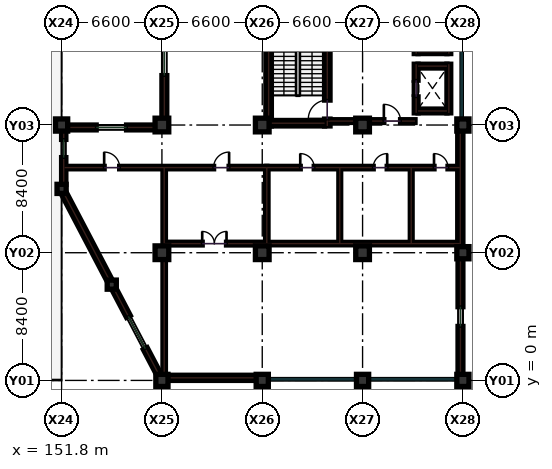
"""IFC4 building model, lengths in metres.
Left out: names, types, materials, properties, quantities, classifications, styles, units other than length and angle.
Written with IfcOpenShell. Run it as: python <this file> out.ifc"""

import sys

from ifc_helpers import new_model, si_unit, direction, frame, frame_2d, origin, origin_2d, place, context, subcontext, project, spatial, rectangle, extrude, element, fill, save


model = new_model("IFC4")
c1 = context("Model", 3, precision=1e-05, world=origin(), true_north=direction((0.0, 1.0)))
c2 = subcontext(c1, "Body", "Model", "MODEL_VIEW")
j1 = project(units=[si_unit("LENGTHUNIT", "METRE"), si_unit("PLANEANGLEUNIT", "RADIAN")], contexts=[c1])
p1 = place(None, origin())
s1 = spatial("IfcSite", under=j1, at=p1, CompositionType="ELEMENT")
p2 = place(p1, origin())
s2 = spatial("IfcBuilding", under=s1, at=p2, CompositionType="ELEMENT")
p3 = place(p2, frame((0.0, 0.0, 5.4)))
s3 = spatial("IfcBuildingStorey", under=s2, at=p3, CompositionType="ELEMENT", Elevation=5.4)
for number, where, z_axis, x_axis in (
    (1, (151.8, 16.8, 0.0), (0.0, 0.0, 1.0), (1.0, 0.0, 0.0)),
    (2, (158.4, 0.0, 0.0), (0.0, 0.0, 1.0), (1.0, 0.0, 0.0)),
):
    element("IfcColumn", number, at=place(p3, frame(where, z_axis=z_axis, x_axis=x_axis)), inside=s3, PredefinedType="COLUMN", context=c2, shape_type="SweptSolid", body=[
        extrude(rectangle(XDim=0.8, YDim=0.8, at=origin_2d()), origin(), (0.0, 0.0, 1.0), 4.5),
    ])
for number, where, z_axis, x_axis in (
    (3, (158.4, 8.4, 0.0), (0.0, 0.0, 1.0), (1.0, 0.0, 0.0)),
    (4, (158.4, 16.8, 0.0), (0.0, 0.0, 1.0), (1.0, 0.0, 0.0)),
):
    element("IfcColumn", number, at=place(p3, frame(where, z_axis=z_axis, x_axis=x_axis)), inside=s3, PredefinedType="COLUMN", context=c2, shape_type="SweptSolid", body=[
        extrude(rectangle(XDim=0.9, YDim=0.9, at=origin_2d()), origin(), (0.0, 0.0, 1.0), 4.5),
    ])
p4 = place(p3, frame((165.0, 0.0, 0.0), z_axis=(0.0, 0.0, 1.0), x_axis=(1.0, 0.0, 0.0)))
e5 = element("IfcColumn", 5, at=p4, inside=s3, PredefinedType="COLUMN", context=c2, shape_type="SweptSolid", body=[
    extrude(rectangle(XDim=0.8, YDim=0.8, at=origin_2d()), origin(), (0.0, 0.0, 1.0), 4.5),
])
for number, where, z_axis, x_axis in (
    (6, (165.0, 8.4, 0.0), (0.0, 0.0, 1.0), (1.0, 0.0, 0.0)),
    (7, (165.0, 16.8, 0.0), (0.0, 0.0, 1.0), (1.0, 0.0, 0.0)),
):
    element("IfcColumn", number, at=place(p3, frame(where, z_axis=z_axis, x_axis=x_axis)), inside=s3, PredefinedType="COLUMN", context=c2, shape_type="SweptSolid", body=[
        extrude(rectangle(XDim=0.9, YDim=0.9, at=origin_2d()), origin(), (0.0, 0.0, 1.0), 4.5),
    ])
p5 = place(p3, frame((171.6, 0.0, 0.0), z_axis=(0.0, 0.0, 1.0), x_axis=(1.0, 0.0, 0.0)))
e8 = element("IfcColumn", 8, at=p5, inside=s3, PredefinedType="COLUMN", context=c2, shape_type="SweptSolid", body=[
    extrude(rectangle(XDim=0.8, YDim=0.8, at=origin_2d()), origin(), (0.0, 0.0, 1.0), 4.5),
])
for number, where, z_axis, x_axis in (
    (9, (171.6, 8.4, 0.0), (0.0, 0.0, 1.0), (1.0, 0.0, 0.0)),
    (10, (171.6, 16.8, 0.0), (0.0, 0.0, 1.0), (1.0, 0.0, 0.0)),
):
    element("IfcColumn", number, at=place(p3, frame(where, z_axis=z_axis, x_axis=x_axis)), inside=s3, PredefinedType="COLUMN", context=c2, shape_type="SweptSolid", body=[
        extrude(rectangle(XDim=0.9, YDim=0.9, at=origin_2d()), origin(), (0.0, 0.0, 1.0), 4.5),
    ])
for number, where, z_axis, x_axis in (
    (11, (178.2, 0.0, 0.0), (0.0, 0.0, 1.0), (1.0, 0.0, 0.0)),
    (12, (178.2, 8.4, 0.0), (0.0, 0.0, 1.0), (1.0, 0.0, 0.0)),
    (13, (178.2, 16.8, 0.0), (0.0, 0.0, 1.0), (1.0, 0.0, 0.0)),
):
    element("IfcColumn", number, at=place(p3, frame(where, z_axis=z_axis, x_axis=x_axis)), inside=s3, PredefinedType="COLUMN", context=c2, shape_type="SweptSolid", body=[
        extrude(rectangle(XDim=0.8, YDim=0.8, at=origin_2d()), origin(), (0.0, 0.0, 1.0), 4.5),
    ])
for number, where, z_axis, x_axis in (
    (14, (151.8, 12.6, 0.0), (0.0, 0.0, 1.0), (1.0, 0.0, 0.0)),
    (15, (155.1, 6.3, 0.0), (0.0, 0.0, 1.0), (1.0, 0.0, 0.0)),
):
    element("IfcColumn", number, at=place(p3, frame(where, z_axis=z_axis, x_axis=x_axis)), inside=s3, PredefinedType="COLUMN", context=c2, shape_type="SweptSolid", body=[
        extrude(rectangle(XDim=0.6, YDim=0.6, at=origin_2d()), origin(), (0.0, 0.0, 1.0), 4.5),
    ])
p6 = place(p3, frame((165.3, 14.0, 0.0), z_axis=(0.0, 0.0, 1.0), x_axis=(1.0, 0.0, 0.0)))
e16 = element("IfcWall", 16, at=p6, inside=s3, PredefinedType="PARTITIONING", context=c2, shape_type="SweptSolid", body=[
    extrude(rectangle(XDim=12.7, YDim=0.16, at=frame_2d((6.35, 0.0))), origin(), (0.0, 0.0, 1.0), 3.45),
])
p7 = place(p6, frame((2.2, 0.0, 0.0)))
e17 = element("IfcOpeningElement", 17, at=p7, cuts=e16, PredefinedType="OPENING", context=c2, shape_type="SweptSolid", body=[
    extrude(rectangle(XDim=0.92, YDim=2.08, at=frame_2d((0.46, 1.04))), frame((0.0, 0.09, 0.0), z_axis=(0.0, -1.0, 0.0), x_axis=(1.0, 0.0, 0.0)), (0.0, 0.0, 1.0), 0.18),
])
p8 = place(p6, frame((7.0, 0.0, 0.0)))
e18 = element("IfcOpeningElement", 18, at=p8, cuts=e16, PredefinedType="OPENING", context=c2, shape_type="SweptSolid", body=[
    extrude(rectangle(XDim=0.92, YDim=2.08, at=frame_2d((0.46, 1.04))), frame((0.0, 0.09, 0.0), z_axis=(0.0, -1.0, 0.0), x_axis=(1.0, 0.0, 0.0)), (0.0, 0.0, 1.0), 0.18),
])
p9 = place(p6, frame((11.0, 0.0, 0.0)))
e19 = element("IfcOpeningElement", 19, at=p9, cuts=e16, PredefinedType="OPENING", context=c2, shape_type="SweptSolid", body=[
    extrude(rectangle(XDim=0.92, YDim=2.08, at=frame_2d((0.46, 1.04))), frame((0.0, 0.09, 0.0), z_axis=(0.0, -1.0, 0.0), x_axis=(1.0, 0.0, 0.0)), (0.0, 0.0, 1.0), 0.18),
])
p10 = place(p3, frame((165.3, 9.0, 0.0), z_axis=(0.0, 0.0, 1.0), x_axis=(1.0, 0.0, 0.0)))
e20 = element("IfcWall", 20, at=p10, inside=s3, PredefinedType="PARTITIONING", context=c2, shape_type="SweptSolid", body=[
    extrude(rectangle(XDim=12.7, YDim=0.16, at=frame_2d((6.35, 0.0))), origin(), (0.0, 0.0, 1.0), 3.45),
])
p11 = place(p3, frame((165.3, 9.0, 0.0), z_axis=(0.0, 0.0, 1.0), x_axis=(0.0, 1.0, 0.0)))
e21 = element("IfcWall", 21, at=p11, inside=s3, PredefinedType="PARTITIONING", context=c2, shape_type="SweptSolid", body=[
    extrude(rectangle(XDim=5.0, YDim=0.16, at=frame_2d((2.5, 0.0))), origin(), (0.0, 0.0, 1.0), 3.45),
])
for number, where, z_axis, x_axis in (
    (22, (170.1, 9.0, 0.0), (0.0, 0.0, 1.0), (0.0, 1.0, 0.0)),
    (23, (174.8, 9.0, 0.0), (0.0, 0.0, 1.0), (0.0, 1.0, 0.0)),
):
    element("IfcWall", number, at=place(p3, frame(where, z_axis=z_axis, x_axis=x_axis)), inside=s3, PredefinedType="PARTITIONING", context=c2, shape_type="SweptSolid", body=[
        extrude(rectangle(XDim=5.0, YDim=0.12, at=frame_2d((2.5, 0.0))), origin(), (0.0, 0.0, 1.0), 3.45),
    ])
p12 = place(p3, frame((158.55, 9.0, 0.0), z_axis=(0.0, 0.0, 1.0), x_axis=(1.0, 0.0, 0.0)))
e24 = element("IfcWall", 24, at=p12, inside=s3, PredefinedType="SOLIDWALL", context=c2, shape_type="SweptSolid", body=[
    extrude(rectangle(XDim=6.75, YDim=0.18, at=frame_2d((3.375, 0.0))), origin(), (0.0, 0.0, 1.0), 3.45),
])
p13 = place(p12, frame((2.5, 0.0, 0.0)))
e25 = element("IfcOpeningElement", 25, at=p13, cuts=e24, PredefinedType="OPENING", context=c2, shape_type="SweptSolid", body=[
    extrude(rectangle(XDim=1.6, YDim=2.2, at=frame_2d((0.8, 1.1))), frame((0.0, 0.1, 0.0), z_axis=(0.0, -1.0, 0.0), x_axis=(1.0, 0.0, 0.0)), (0.0, 0.0, 1.0), 0.2),
])
p14 = place(p3, frame((158.55, 0.25, 0.0), z_axis=(0.0, 0.0, 1.0), x_axis=(0.0, 1.0, 0.0)))
e26 = element("IfcWall", 26, at=p14, inside=s3, PredefinedType="PARTITIONING", context=c2, shape_type="SweptSolid", body=[
    extrude(rectangle(XDim=7.7, YDim=0.16, at=frame_2d((3.85, 0.0))), origin(), (0.0, 0.0, 1.0), 3.45),
])
p15 = place(p3, frame((158.55, 8.85, 0.0), z_axis=(0.0, 0.0, 1.0), x_axis=(0.0, 1.0, 0.0)))
e27 = element("IfcWall", 27, at=p15, inside=s3, PredefinedType="PARTITIONING", context=c2, shape_type="SweptSolid", body=[
    extrude(rectangle(XDim=5.15, YDim=0.16, at=frame_2d((2.575, 0.0))), origin(), (0.0, 0.0, 1.0), 3.45),
])
p16 = place(p3, frame((152.0, 14.0, 0.0), z_axis=(0.0, 0.0, 1.0), x_axis=(1.0, 0.0, 0.0)))
e28 = element("IfcWall", 28, at=p16, inside=s3, PredefinedType="PARTITIONING", context=c2, shape_type="SweptSolid", body=[
    extrude(rectangle(XDim=13.3, YDim=0.16, at=frame_2d((6.65, 0.0))), origin(), (0.0, 0.0, 1.0), 3.45),
])
p17 = place(p16, frame((2.6, 0.0, 0.0)))
e29 = element("IfcOpeningElement", 29, at=p17, cuts=e28, PredefinedType="OPENING", context=c2, shape_type="SweptSolid", body=[
    extrude(rectangle(XDim=1.02, YDim=2.18, at=frame_2d((0.51, 1.09))), frame((0.0, 0.09, 0.0), z_axis=(0.0, -1.0, 0.0), x_axis=(1.0, 0.0, 0.0)), (0.0, 0.0, 1.0), 0.18),
])
p18 = place(p16, frame((9.8, 0.0, 0.0)))
e30 = element("IfcOpeningElement", 30, at=p18, cuts=e28, PredefinedType="OPENING", context=c2, shape_type="SweptSolid", body=[
    extrude(rectangle(XDim=1.02, YDim=2.18, at=frame_2d((0.51, 1.09))), frame((0.0, 0.09, 0.0), z_axis=(0.0, -1.0, 0.0), x_axis=(1.0, 0.0, 0.0)), (0.0, 0.0, 1.0), 0.18),
])
p19 = place(p3, frame((157.955, 16.64, 0.0), z_axis=(0.0, 0.0, 1.0), x_axis=(-1.0, 0.0, 0.0)))
e31 = element("IfcWall", 31, at=p19, inside=s3, PredefinedType="SOLIDWALL", context=c2, shape_type="SweptSolid", body=[
    extrude(rectangle(XDim=5.76, YDim=0.32, at=frame_2d((2.88, 0.0))), origin(), (0.0, 0.0, 1.0), 3.585),
])
p20 = place(p19, frame((1.88, 0.0, 0.95)))
e32 = element("IfcOpeningElement", 32, at=p20, cuts=e31, PredefinedType="OPENING", context=c2, shape_type="SweptSolid", body=[
    extrude(rectangle(XDim=2.0, YDim=1.95, at=frame_2d((1.0, 0.975))), frame((0.0, 0.17, 0.0), z_axis=(0.0, -1.0, 0.0), x_axis=(1.0, 0.0, 0.0)), (0.0, 0.0, 1.0), 0.34),
])
p21 = place(p3, frame((158.795, 0.17, 0.0), z_axis=(0.0, 0.0, 1.0), x_axis=(1.0, 0.0, 0.0)))
e33 = element("IfcWall", 33, at=p21, inside=s3, PredefinedType="SHEAR", context=c2, shape_type="SweptSolid", body=[
    extrude(rectangle(XDim=5.81, YDim=0.34, at=frame_2d((2.905, 0.0))), origin(), (0.0, 0.0, 1.0), 4.2),
])
p22 = place(p3, frame((158.56, 24.755, 0.0), z_axis=(0.0, 0.0, 1.0), x_axis=(0.0, -1.0, 0.0)))
e34 = element("IfcWall", 34, at=p22, inside=s3, PredefinedType="SOLIDWALL", context=c2, shape_type="SweptSolid", body=[
    extrude(rectangle(XDim=7.51, YDim=0.32, at=frame_2d((3.755, 0.0))), origin(), (0.0, 0.0, 1.0), 3.485),
])
p23 = place(p22, frame((2.805, 0.0, 0.95)))
e35 = element("IfcOpeningElement", 35, at=p23, cuts=e34, PredefinedType="OPENING", context=c2, shape_type="SweptSolid", body=[
    extrude(rectangle(XDim=1.9, YDim=1.85, at=frame_2d((0.95, 0.925))), frame((0.0, 0.17, 0.0), z_axis=(0.0, -1.0, 0.0), x_axis=(1.0, 0.0, 0.0)), (0.0, 0.0, 1.0), 0.34),
])
p24 = place(p3, frame((178.04, 0.395, 0.0), z_axis=(0.0, 0.0, 1.0), x_axis=(0.0, 1.0, 0.0)))
e36 = element("IfcWall", 36, at=p24, inside=s3, PredefinedType="SOLIDWALL", context=c2, shape_type="SweptSolid", body=[
    extrude(rectangle(XDim=7.61, YDim=0.32, at=frame_2d((3.805, 0.0))), origin(), (0.0, 0.0, 1.0), 3.485),
])
p25 = place(p24, frame((3.155, 0.0, 0.95)))
e37 = element("IfcOpeningElement", 37, at=p25, cuts=e36, PredefinedType="OPENING", context=c2, shape_type="SweptSolid", body=[
    extrude(rectangle(XDim=1.3, YDim=1.75, at=frame_2d((0.65, 0.875))), frame((0.0, 0.17, 0.0), z_axis=(0.0, -1.0, 0.0), x_axis=(1.0, 0.0, 0.0)), (0.0, 0.0, 1.0), 0.34),
])
p26 = place(p3, frame((178.03, 8.795, 0.0), z_axis=(0.0, 0.0, 1.0), x_axis=(0.0, 1.0, 0.0)))
e38 = element("IfcWall", 38, at=p26, inside=s3, PredefinedType="SHEAR", context=c2, shape_type="SweptSolid", body=[
    extrude(rectangle(XDim=7.61, YDim=0.34, at=frame_2d((3.805, 0.0))), origin(), (0.0, 0.0, 1.0), 4.2),
])
p27 = place(p3, frame((151.94, 16.405, 0.0), z_axis=(0.0, 0.0, 1.0), x_axis=(0.0, -1.0, 0.0)))
e39 = element("IfcWall", 39, at=p27, inside=s3, PredefinedType="SOLIDWALL", context=c2, shape_type="SweptSolid", body=[
    extrude(rectangle(XDim=3.51, YDim=0.28, at=frame_2d((1.755, 0.0))), origin(), (0.0, 0.0, 1.0), 3.585),
])
p28 = place(p27, frame((0.55, 0.0, 0.95)))
e40 = element("IfcOpeningElement", 40, at=p28, cuts=e39, PredefinedType="OPENING", context=c2, shape_type="SweptSolid", body=[
    extrude(rectangle(XDim=1.2, YDim=1.5, at=frame_2d((0.6, 0.75))), frame((0.0, 0.15, 0.0), z_axis=(0.0, -1.0, 0.0), x_axis=(1.0, 0.0, 0.0)), (0.0, 0.0, 1.0), 0.3),
])
p29 = place(p3, frame((151.95, 12.31, 0.0), z_axis=(0.0, 0.0, 1.0), x_axis=(0.464471613901, -0.885588007981, 0.0)))
e41 = element("IfcWall", 41, at=p29, inside=s3, PredefinedType="SHEAR", context=c2, shape_type="SweptSolid", body=[
    extrude(rectangle(XDim=6.459, YDim=0.34, at=frame_2d((3.229, 0.0))), origin(), (0.0, 0.0, 1.0), 4.2),
])
p30 = place(p3, frame((155.25, 6.01, 0.0), z_axis=(0.0, 0.0, 1.0), x_axis=(0.464471613901, -0.885588007981, 0.0)))
e42 = element("IfcWall", 42, at=p30, inside=s3, PredefinedType="SOLIDWALL", context=c2, shape_type="SweptSolid", body=[
    extrude(rectangle(XDim=6.459, YDim=0.28, at=frame_2d((3.229, 0.0))), origin(), (0.0, 0.0, 1.0), 3.585),
])
p31 = place(p30, frame((2.03, 0.0, 0.95)))
e43 = element("IfcOpeningElement", 43, at=p31, cuts=e42, PredefinedType="OPENING", context=c2, shape_type="SweptSolid", body=[
    extrude(rectangle(XDim=2.4, YDim=1.6, at=frame_2d((1.2, 0.8))), frame((0.0, 0.15, 0.0), z_axis=(0.0, -1.0, 0.0), x_axis=(1.0, 0.0, 0.0)), (0.0, 0.0, 1.0), 0.3),
])
p32 = place(p3, frame((165.42, 16.74, 0.0), z_axis=(0.0, 0.0, 1.0), x_axis=(0.0, 1.0, 0.0)))
e44 = element("IfcWall", 44, at=p32, inside=s3, PredefinedType="SHEAR", context=c2, shape_type="SweptSolid", body=[
    extrude(rectangle(XDim=8.37, YDim=0.36, at=frame_2d((4.185, 0.0))), origin(), (0.0, 0.0, 1.0), 4.2),
])
p33 = place(p3, frame((169.28, 16.74, 0.0), z_axis=(0.0, 0.0, 1.0), x_axis=(0.0, 1.0, 0.0)))
e45 = element("IfcWall", 45, at=p33, inside=s3, PredefinedType="SHEAR", context=c2, shape_type="SweptSolid", body=[
    extrude(rectangle(XDim=8.37, YDim=0.36, at=frame_2d((4.185, 0.0))), origin(), (0.0, 0.0, 1.0), 4.2),
])
p34 = place(p33, frame((0.45, 0.0, 0.0)))
e46 = element("IfcOpeningElement", 46, at=p34, cuts=e45, PredefinedType="OPENING", context=c2, shape_type="SweptSolid", body=[
    extrude(rectangle(XDim=1.25, YDim=2.15, at=frame_2d((0.625, 1.075))), frame((0.0, 0.19, 0.0), z_axis=(0.0, -1.0, 0.0), x_axis=(1.0, 0.0, 0.0)), (0.0, 0.0, 1.0), 0.38),
])
p35 = place(p3, frame((165.6, 16.92, 0.0), z_axis=(0.0, 0.0, 1.0), x_axis=(1.0, 0.0, 0.0)))
e47 = element("IfcWall", 47, at=p35, inside=s3, PredefinedType="SHEAR", context=c2, shape_type="SweptSolid", body=[
    extrude(rectangle(XDim=3.5, YDim=0.36, at=frame_2d((1.75, 0.0))), origin(), (0.0, 0.0, 1.0), 4.2),
])
p36 = place(p3, frame((175.125, 17.6, 0.0), z_axis=(0.0, 0.0, 1.0), x_axis=(0.0, 1.0, 0.0)))
e48 = element("IfcWall", 48, at=p36, inside=s3, PredefinedType="SHEAR", context=c2, shape_type="SweptSolid", body=[
    extrude(rectangle(XDim=3.2, YDim=0.25, at=frame_2d((1.6, 0.0))), origin(), (0.0, 0.0, 1.0), 4.2),
])
p37 = place(p36, frame((1.05, 0.0, 0.0)))
e49 = element("IfcOpeningElement", 49, at=p37, cuts=e48, PredefinedType="OPENING", context=c2, shape_type="SweptSolid", body=[
    extrude(rectangle(XDim=1.1, YDim=2.15, at=frame_2d((0.55, 1.075))), frame((0.0, 0.135, 0.0), z_axis=(0.0, -1.0, 0.0), x_axis=(1.0, 0.0, 0.0)), (0.0, 0.0, 1.0), 0.27),
])
p38 = place(p3, frame((177.275, 17.6, 0.0), z_axis=(0.0, 0.0, 1.0), x_axis=(0.0, 1.0, 0.0)))
e50 = element("IfcWall", 50, at=p38, inside=s3, PredefinedType="SHEAR", context=c2, shape_type="SweptSolid", body=[
    extrude(rectangle(XDim=3.2, YDim=0.25, at=frame_2d((1.6, 0.0))), origin(), (0.0, 0.0, 1.0), 4.2),
])
for number, where, z_axis, x_axis in (
    (51, (175.25, 17.725, 0.0), (0.0, 0.0, 1.0), (1.0, 0.0, 0.0)),
    (52, (175.25, 20.675, 0.0), (0.0, 0.0, 1.0), (1.0, 0.0, 0.0)),
):
    element("IfcWall", number, at=place(p3, frame(where, z_axis=z_axis, x_axis=x_axis)), inside=s3, PredefinedType="SHEAR", context=c2, shape_type="SweptSolid", body=[
        extrude(rectangle(XDim=1.9, YDim=0.25, at=frame_2d((0.95, 0.0))), origin(), (0.0, 0.0, 1.0), 4.2),
    ])
p39 = place(p3, frame((175.125, 21.5, 0.0), z_axis=(0.0, 0.0, 1.0), x_axis=(0.0, 1.0, 0.0)))
e53 = element("IfcWall", 53, at=p39, inside=s3, PredefinedType="SHEAR", context=c2, shape_type="SweptSolid", body=[
    extrude(rectangle(XDim=3.2, YDim=0.25, at=frame_2d((1.6, 0.0))), origin(), (0.0, 0.0, 1.0), 4.2),
])
p40 = place(p39, frame((1.05, 0.0, 0.0)))
e54 = element("IfcOpeningElement", 54, at=p40, cuts=e53, PredefinedType="OPENING", context=c2, shape_type="SweptSolid", body=[
    extrude(rectangle(XDim=1.1, YDim=2.15, at=frame_2d((0.55, 1.075))), frame((0.0, 0.135, 0.0), z_axis=(0.0, -1.0, 0.0), x_axis=(1.0, 0.0, 0.0)), (0.0, 0.0, 1.0), 0.27),
])
p41 = place(p3, frame((177.275, 21.5, 0.0), z_axis=(0.0, 0.0, 1.0), x_axis=(0.0, 1.0, 0.0)))
e55 = element("IfcWall", 55, at=p41, inside=s3, PredefinedType="SHEAR", context=c2, shape_type="SweptSolid", body=[
    extrude(rectangle(XDim=3.2, YDim=0.25, at=frame_2d((1.6, 0.0))), origin(), (0.0, 0.0, 1.0), 4.2),
])
p42 = place(p3, frame((175.25, 21.625, 0.0), z_axis=(0.0, 0.0, 1.0), x_axis=(1.0, 0.0, 0.0)))
e56 = element("IfcWall", 56, at=p42, inside=s3, PredefinedType="SHEAR", context=c2, shape_type="SweptSolid", body=[
    extrude(rectangle(XDim=1.9, YDim=0.25, at=frame_2d((0.95, 0.0))), origin(), (0.0, 0.0, 1.0), 4.2),
])
p43 = place(p3, frame((169.35, 17.06, 0.0), z_axis=(0.0, 0.0, 1.0), x_axis=(1.0, 0.0, 0.0)))
e57 = element("IfcWall", 57, at=p43, inside=s3, PredefinedType="SOLIDWALL", context=c2, shape_type="SweptSolid", body=[
    extrude(rectangle(XDim=5.7, YDim=0.18, at=frame_2d((2.85, 0.0))), origin(), (0.0, 0.0, 1.0), 3.535),
])
p44 = place(p43, frame((3.65, 0.0, 0.0)))
e58 = element("IfcOpeningElement", 58, at=p44, cuts=e57, PredefinedType="OPENING", context=c2, shape_type="SweptSolid", body=[
    extrude(rectangle(XDim=1.1, YDim=2.15, at=frame_2d((0.55, 1.075))), frame((0.0, 0.1, 0.0), z_axis=(0.0, -1.0, 0.0), x_axis=(1.0, 0.0, 0.0)), (0.0, 0.0, 1.0), 0.2),
])
p45 = place(p7, origin())
e59 = element("IfcDoor", 59, at=p45, inside=s3, OperationType="SINGLE_SWING_LEFT", PredefinedType="DOOR", context=c2, shape_type="SweptSolid", body=[
    extrude(rectangle(XDim=0.92, YDim=2.08, at=frame_2d((0.46, 1.04))), frame((0.0, 0.025, 0.0), z_axis=(0.0, -1.0, 0.0), x_axis=(1.0, 0.0, 0.0)), (0.0, 0.0, 1.0), 0.05),
])
fill(e17, e59)
p46 = place(p8, origin())
e60 = element("IfcDoor", 60, at=p46, inside=s3, OperationType="SINGLE_SWING_RIGHT", PredefinedType="DOOR", context=c2, shape_type="SweptSolid", body=[
    extrude(rectangle(XDim=0.92, YDim=2.08, at=frame_2d((0.46, 1.04))), frame((0.0, 0.025, 0.0), z_axis=(0.0, -1.0, 0.0), x_axis=(1.0, 0.0, 0.0)), (0.0, 0.0, 1.0), 0.05),
])
fill(e18, e60)
p47 = place(p9, origin())
e61 = element("IfcDoor", 61, at=p47, inside=s3, OperationType="SINGLE_SWING_LEFT", PredefinedType="DOOR", context=c2, shape_type="SweptSolid", body=[
    extrude(rectangle(XDim=0.92, YDim=2.08, at=frame_2d((0.46, 1.04))), frame((0.0, 0.025, 0.0), z_axis=(0.0, -1.0, 0.0), x_axis=(1.0, 0.0, 0.0)), (0.0, 0.0, 1.0), 0.05),
])
fill(e19, e61)
p48 = place(p13, origin())
e62 = element("IfcDoor", 62, at=p48, inside=s3, OperationType="DOUBLE_DOOR_SINGLE_SWING", PredefinedType="DOOR", context=c2, shape_type="SweptSolid", body=[
    extrude(rectangle(XDim=1.6, YDim=2.2, at=frame_2d((0.8, 1.1))), frame((0.0, 0.025, 0.0), z_axis=(0.0, -1.0, 0.0), x_axis=(1.0, 0.0, 0.0)), (0.0, 0.0, 1.0), 0.05),
])
fill(e25, e62)
p49 = place(p17, origin())
e63 = element("IfcDoor", 63, at=p49, inside=s3, OperationType="SINGLE_SWING_LEFT", PredefinedType="DOOR", context=c2, shape_type="SweptSolid", body=[
    extrude(rectangle(XDim=1.02, YDim=2.18, at=frame_2d((0.51, 1.09))), frame((0.0, 0.025, 0.0), z_axis=(0.0, -1.0, 0.0), x_axis=(1.0, 0.0, 0.0)), (0.0, 0.0, 1.0), 0.05),
])
fill(e29, e63)
p50 = place(p18, origin())
e64 = element("IfcDoor", 64, at=p50, inside=s3, OperationType="SINGLE_SWING_RIGHT", PredefinedType="DOOR", context=c2, shape_type="SweptSolid", body=[
    extrude(rectangle(XDim=1.02, YDim=2.18, at=frame_2d((0.51, 1.09))), frame((0.0, 0.025, 0.0), z_axis=(0.0, -1.0, 0.0), x_axis=(1.0, 0.0, 0.0)), (0.0, 0.0, 1.0), 0.05),
])
fill(e30, e64)
p51 = place(p20, origin())
e65 = element("IfcWindow", 65, at=p51, inside=s3, PartitioningType="SINGLE_PANEL", PredefinedType="WINDOW", context=c2, shape_type="SweptSolid", body=[
    extrude(rectangle(XDim=2.0, YDim=1.95, at=frame_2d((1.0, 0.975))), frame((0.0, 0.03, 0.0), z_axis=(0.0, -1.0, 0.0), x_axis=(1.0, 0.0, 0.0)), (0.0, 0.0, 1.0), 0.06),
])
fill(e32, e65)
p52 = place(p23, origin())
e66 = element("IfcWindow", 66, at=p52, inside=s3, PartitioningType="SINGLE_PANEL", PredefinedType="WINDOW", context=c2, shape_type="SweptSolid", body=[
    extrude(rectangle(XDim=1.9, YDim=1.85, at=frame_2d((0.95, 0.925))), frame((0.0, 0.03, 0.0), z_axis=(0.0, -1.0, 0.0), x_axis=(1.0, 0.0, 0.0)), (0.0, 0.0, 1.0), 0.06),
])
fill(e35, e66)
p53 = place(p25, origin())
e67 = element("IfcWindow", 67, at=p53, inside=s3, PartitioningType="SINGLE_PANEL", PredefinedType="WINDOW", context=c2, shape_type="SweptSolid", body=[
    extrude(rectangle(XDim=1.3, YDim=1.75, at=frame_2d((0.65, 0.875))), frame((0.0, 0.03, 0.0), z_axis=(0.0, -1.0, 0.0), x_axis=(1.0, 0.0, 0.0)), (0.0, 0.0, 1.0), 0.06),
])
fill(e37, e67)
p54 = place(p28, origin())
e68 = element("IfcWindow", 68, at=p54, inside=s3, PartitioningType="SINGLE_PANEL", PredefinedType="WINDOW", context=c2, shape_type="SweptSolid", body=[
    extrude(rectangle(XDim=1.2, YDim=1.5, at=frame_2d((0.6, 0.75))), frame((0.0, 0.03, 0.0), z_axis=(0.0, -1.0, 0.0), x_axis=(1.0, 0.0, 0.0)), (0.0, 0.0, 1.0), 0.06),
])
fill(e40, e68)
p55 = place(p31, origin())
e69 = element("IfcWindow", 69, at=p55, inside=s3, PartitioningType="SINGLE_PANEL", PredefinedType="WINDOW", context=c2, shape_type="SweptSolid", body=[
    extrude(rectangle(XDim=2.4, YDim=1.6, at=frame_2d((1.2, 0.8))), frame((0.0, 0.03, 0.0), z_axis=(0.0, -1.0, 0.0), x_axis=(1.0, 0.0, 0.0)), (0.0, 0.0, 1.0), 0.06),
])
fill(e43, e69)
p56 = place(p34, origin())
e70 = element("IfcDoor", 70, at=p56, inside=s3, OperationType="SINGLE_SWING_LEFT", PredefinedType="DOOR", context=c2, shape_type="SweptSolid", body=[
    extrude(rectangle(XDim=1.25, YDim=2.15, at=frame_2d((0.625, 1.075))), frame((0.0, 0.025, 0.0), z_axis=(0.0, -1.0, 0.0), x_axis=(1.0, 0.0, 0.0)), (0.0, 0.0, 1.0), 0.05),
])
fill(e46, e70)
p57 = place(p37, origin())
e71 = element("IfcDoor", 71, at=p57, inside=s3, OperationType="SLIDING_TO_LEFT", PredefinedType="DOOR", context=c2, shape_type="SweptSolid", body=[
    extrude(rectangle(XDim=1.1, YDim=2.15, at=frame_2d((0.55, 1.075))), frame((0.0, 0.025, 0.0), z_axis=(0.0, -1.0, 0.0), x_axis=(1.0, 0.0, 0.0)), (0.0, 0.0, 1.0), 0.05),
])
fill(e49, e71)
p58 = place(p44, origin())
e72 = element("IfcDoor", 72, at=p58, inside=s3, OperationType="SINGLE_SWING_LEFT", PredefinedType="DOOR", context=c2, shape_type="SweptSolid", body=[
    extrude(rectangle(XDim=1.1, YDim=2.15, at=frame_2d((0.55, 1.075))), frame((0.0, 0.025, 0.0), z_axis=(0.0, -1.0, 0.0), x_axis=(1.0, 0.0, 0.0)), (0.0, 0.0, 1.0), 0.05),
])
fill(e58, e72)
save(model, sys.argv[1])
